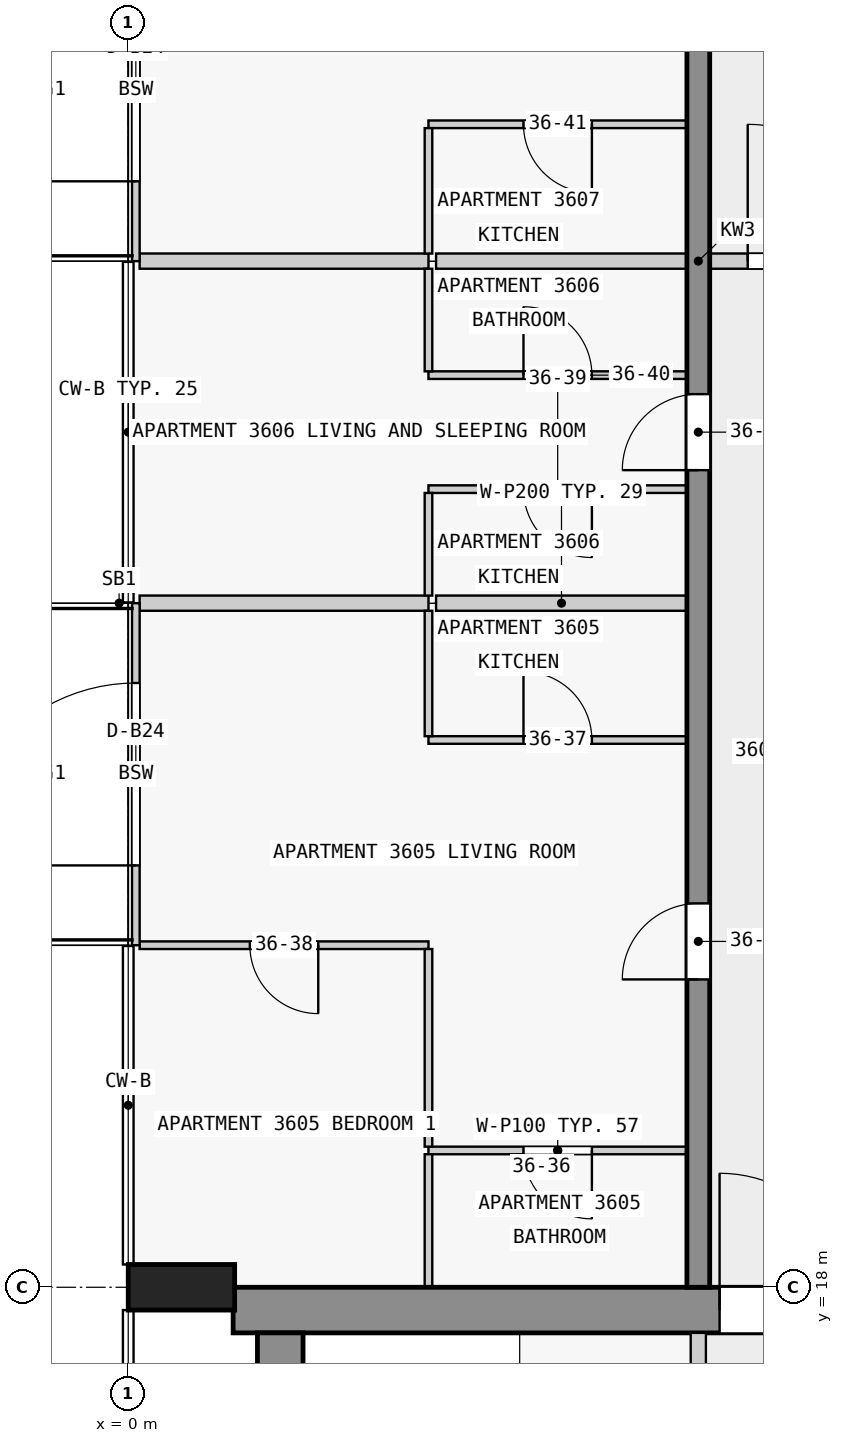
"""IFC4 building model, lengths in metres.
Left out: names, types, materials, properties, quantities, classifications, styles, units other than length and angle.
Written with IfcOpenShell. Run it as: python <this file> out.ifc"""

import sys

from ifc_helpers import new_model, si_unit, direction, frame, frame_2d, origin, origin_2d, place, context, subcontext, project, spatial, rectangle, extrude, element, fill, save


model = new_model("IFC4")
c1 = context("Model", 3, precision=1e-05, world=origin(), true_north=direction((0.0, 1.0)))
c2 = subcontext(c1, "Body", "Model", "MODEL_VIEW")
j1 = project(units=[si_unit("LENGTHUNIT", "METRE"), si_unit("PLANEANGLEUNIT", "RADIAN")], contexts=[c1])
p1 = place(None, origin())
s1 = spatial("IfcSite", under=j1, at=p1, CompositionType="ELEMENT")
p2 = place(p1, origin())
s2 = spatial("IfcBuilding", under=s1, at=p2, CompositionType="ELEMENT")
p3 = place(p2, frame((0.0, 0.0, 142.9)))
s3 = spatial("IfcBuildingStorey", under=s2, at=p3, CompositionType="ELEMENT", Elevation=142.9)
p4 = place(p3, frame((0.7, 18.0, 0.0), z_axis=(0.0, 0.0, 1.0), x_axis=(0.0, 1.0, 0.0)))
e1 = element("IfcColumn", 1, at=p4, inside=s3, PredefinedType="COLUMN", context=c2, shape_type="SweptSolid", body=[
    extrude(rectangle(XDim=0.6, YDim=1.4, at=origin_2d()), origin(), (0.0, 0.0, 1.0), 3.5),
])
p5 = place(p3, frame((1.38, 17.7, 0.0), z_axis=(0.0, 0.0, 1.0), x_axis=(1.0, 0.0, 0.0)))
e2 = element("IfcWall", 2, at=p5, inside=s3, PredefinedType="SHEAR", context=c2, shape_type="SweptSolid", body=[
    extrude(rectangle(XDim=21.12, YDim=0.6, at=frame_2d((10.56, 0.0))), origin(), (0.0, 0.0, 1.0), 3.25),
])
p6 = place(p5, frame((6.4, 0.0, 0.0)))
e3 = element("IfcOpeningElement", 3, at=p6, cuts=e2, PredefinedType="OPENING", context=c2, shape_type="SweptSolid", body=[
    extrude(rectangle(XDim=1.8, YDim=2.1, at=frame_2d((0.9, 1.05))), frame((0.0, 0.31, 0.0), z_axis=(0.0, -1.0, 0.0), x_axis=(1.0, 0.0, 0.0)), (0.0, 0.0, 1.0), 0.62),
])
p7 = place(p3, frame((2.0, 2.5, 0.0), z_axis=(0.0, 0.0, 1.0), x_axis=(0.0, 1.0, 0.0)))
e4 = element("IfcWall", 4, at=p7, inside=s3, PredefinedType="SHEAR", context=c2, shape_type="SweptSolid", body=[
    extrude(rectangle(XDim=14.9, YDim=0.6, at=frame_2d((7.45, 0.0))), origin(), (0.0, 0.0, 1.0), 3.25),
])
p8 = place(p3, frame((7.5, 18.0, 0.0), z_axis=(0.0, 0.0, 1.0), x_axis=(0.0, 1.0, 0.0)))
e5 = element("IfcWall", 5, at=p8, inside=s3, PredefinedType="SHEAR", context=c2, shape_type="SweptSolid", body=[
    extrude(rectangle(XDim=27.0, YDim=0.3, at=frame_2d((13.5, 0.0))), origin(), (0.0, 0.0, 1.0), 3.25),
])
p9 = place(p8, frame((4.05, 0.0, 0.0)))
e6 = element("IfcOpeningElement", 6, at=p9, cuts=e5, PredefinedType="OPENING", context=c2, shape_type="SweptSolid", body=[
    extrude(rectangle(XDim=1.0, YDim=2.1, at=frame_2d((0.5, 1.05))), frame((0.0, 0.16, 0.0), z_axis=(0.0, -1.0, 0.0), x_axis=(1.0, 0.0, 0.0)), (0.0, 0.0, 1.0), 0.32),
])
p10 = place(p8, frame((10.75, 0.0, 0.0)))
e7 = element("IfcOpeningElement", 7, at=p10, cuts=e5, PredefinedType="OPENING", context=c2, shape_type="SweptSolid", body=[
    extrude(rectangle(XDim=1.0, YDim=2.1, at=frame_2d((0.5, 1.05))), frame((0.0, 0.16, 0.0), z_axis=(0.0, -1.0, 0.0), x_axis=(1.0, 0.0, 0.0)), (0.0, 0.0, 1.0), 0.32),
])
p11 = place(p8, frame((17.55, 0.0, 0.0)))
e8 = element("IfcOpeningElement", 8, at=p11, cuts=e5, PredefinedType="OPENING", context=c2, shape_type="SweptSolid", body=[
    extrude(rectangle(XDim=1.0, YDim=2.1, at=frame_2d((0.5, 1.05))), frame((0.0, 0.16, 0.0), z_axis=(0.0, -1.0, 0.0), x_axis=(1.0, 0.0, 0.0)), (0.0, 0.0, 1.0), 0.32),
])
p12 = place(p8, frame((23.25, 0.0, 0.0)))
e9 = element("IfcOpeningElement", 9, at=p12, cuts=e5, PredefinedType="OPENING", context=c2, shape_type="SweptSolid", body=[
    extrude(rectangle(XDim=0.9, YDim=2.1, at=frame_2d((0.45, 1.05))), frame((0.0, 0.16, 0.0), z_axis=(0.0, -1.0, 0.0), x_axis=(1.0, 0.0, 0.0)), (0.0, 0.0, 1.0), 0.32),
])
p13 = place(p8, frame((25.45, 0.0, 0.0)))
e10 = element("IfcOpeningElement", 10, at=p13, cuts=e5, PredefinedType="OPENING", context=c2, shape_type="SweptSolid", body=[
    extrude(rectangle(XDim=1.0, YDim=2.1, at=frame_2d((0.5, 1.05))), frame((0.0, 0.16, 0.0), z_axis=(0.0, -1.0, 0.0), x_axis=(1.0, 0.0, 0.0)), (0.0, 0.0, 1.0), 0.32),
])
p14 = place(p3, frame((0.1, 22.5, 0.0), z_axis=(0.0, 0.0, 1.0), x_axis=(0.0, 1.0, 0.0)))
e11 = element("IfcWall", 11, at=p14, inside=s3, PredefinedType="STANDARD", context=c2, shape_type="SweptSolid", body=[
    extrude(rectangle(XDim=4.5, YDim=0.1, at=frame_2d((2.25, 0.0))), origin(), (0.0, 0.0, 1.0), 3.25),
])
p15 = place(p14, frame((1.05, 0.0, 0.0)))
e12 = element("IfcOpeningElement", 12, at=p15, cuts=e11, PredefinedType="OPENING", context=c2, shape_type="SweptSolid", body=[
    extrude(rectangle(XDim=2.4, YDim=2.4, at=frame_2d((1.2, 1.2))), frame((0.0, 0.06, 0.0), z_axis=(0.0, -1.0, 0.0), x_axis=(1.0, 0.0, 0.0)), (0.0, 0.0, 1.0), 0.12),
])
p16 = place(p3, frame((0.1, 31.5, 0.0), z_axis=(0.0, 0.0, 1.0), x_axis=(0.0, 1.0, 0.0)))
e13 = element("IfcWall", 13, at=p16, inside=s3, PredefinedType="STANDARD", context=c2, shape_type="SweptSolid", body=[
    extrude(rectangle(XDim=4.5, YDim=0.1, at=frame_2d((2.25, 0.0))), origin(), (0.0, 0.0, 1.0), 3.25),
])
p17 = place(p16, frame((1.05, 0.0, 0.0)))
e14 = element("IfcOpeningElement", 14, at=p17, cuts=e13, PredefinedType="OPENING", context=c2, shape_type="SweptSolid", body=[
    extrude(rectangle(XDim=2.4, YDim=2.4, at=frame_2d((1.2, 1.2))), frame((0.0, 0.06, 0.0), z_axis=(0.0, -1.0, 0.0), x_axis=(1.0, 0.0, 0.0)), (0.0, 0.0, 1.0), 0.12),
])
p18 = place(p3, frame((7.5, 10.1, 0.0), z_axis=(0.0, 0.0, 1.0), x_axis=(0.0, 1.0, 0.0)))
e15 = element("IfcWall", 15, at=p18, inside=s3, PredefinedType="PARTITIONING", context=c2, shape_type="SweptSolid", body=[
    extrude(rectangle(XDim=7.3, YDim=0.2, at=frame_2d((3.65, 0.0))), origin(), (0.0, 0.0, 1.0), 3.25),
])
p19 = place(p18, frame((0.75, 0.0, 0.0)))
e16 = element("IfcOpeningElement", 16, at=p19, cuts=e15, PredefinedType="OPENING", context=c2, shape_type="SweptSolid", body=[
    extrude(rectangle(XDim=0.9, YDim=2.1, at=frame_2d((0.45, 1.05))), frame((0.0, 0.11, 0.0), z_axis=(0.0, -1.0, 0.0), x_axis=(1.0, 0.0, 0.0)), (0.0, 0.0, 1.0), 0.22),
])
p20 = place(p18, frame((4.4, 0.0, 0.0)))
e17 = element("IfcOpeningElement", 17, at=p20, cuts=e15, PredefinedType="OPENING", context=c2, shape_type="SweptSolid", body=[
    extrude(rectangle(XDim=0.9, YDim=2.1, at=frame_2d((0.45, 1.05))), frame((0.0, 0.11, 0.0), z_axis=(0.0, -1.0, 0.0), x_axis=(1.0, 0.0, 0.0)), (0.0, 0.0, 1.0), 0.22),
])
p21 = place(p3, frame((7.35, 19.8, 0.0), z_axis=(0.0, 0.0, 1.0), x_axis=(-1.0, 0.0, 0.0)))
e18 = element("IfcWall", 18, at=p21, inside=s3, PredefinedType="PARTITIONING", context=c2, shape_type="SweptSolid", body=[
    extrude(rectangle(XDim=3.4, YDim=0.1, at=frame_2d((1.7, 0.0))), origin(), (0.0, 0.0, 1.0), 3.25),
])
p22 = place(p21, frame((1.25, 0.0, 0.0)))
e19 = element("IfcOpeningElement", 19, at=p22, cuts=e18, PredefinedType="OPENING", context=c2, shape_type="SweptSolid", body=[
    extrude(rectangle(XDim=0.9, YDim=2.1, at=frame_2d((0.45, 1.05))), frame((0.0, 0.06, 0.0), z_axis=(0.0, -1.0, 0.0), x_axis=(1.0, 0.0, 0.0)), (0.0, 0.0, 1.0), 0.12),
])
p23 = place(p3, frame((3.95, 22.5, 0.0), z_axis=(0.0, 0.0, 1.0), x_axis=(-1.0, 0.0, 0.0)))
e20 = element("IfcWall", 20, at=p23, inside=s3, PredefinedType="PARTITIONING", context=c2, shape_type="SweptSolid", body=[
    extrude(rectangle(XDim=3.8, YDim=0.1, at=frame_2d((1.9, 0.0))), origin(), (0.0, 0.0, 1.0), 3.25),
])
p24 = place(p23, frame((1.45, 0.0, 0.0)))
e21 = element("IfcOpeningElement", 21, at=p24, cuts=e20, PredefinedType="OPENING", context=c2, shape_type="SweptSolid", body=[
    extrude(rectangle(XDim=0.9, YDim=2.1, at=frame_2d((0.45, 1.05))), frame((0.0, 0.06, 0.0), z_axis=(0.0, -1.0, 0.0), x_axis=(1.0, 0.0, 0.0)), (0.0, 0.0, 1.0), 0.12),
])
p25 = place(p3, frame((3.95, 25.2, 0.0), z_axis=(0.0, 0.0, 1.0), x_axis=(1.0, 0.0, 0.0)))
e22 = element("IfcWall", 22, at=p25, inside=s3, PredefinedType="PARTITIONING", context=c2, shape_type="SweptSolid", body=[
    extrude(rectangle(XDim=3.4, YDim=0.1, at=frame_2d((1.7, 0.0))), origin(), (0.0, 0.0, 1.0), 3.25),
])
p26 = place(p25, frame((1.25, 0.0, 0.0)))
e23 = element("IfcOpeningElement", 23, at=p26, cuts=e22, PredefinedType="OPENING", context=c2, shape_type="SweptSolid", body=[
    extrude(rectangle(XDim=0.9, YDim=2.1, at=frame_2d((0.45, 1.05))), frame((0.0, 0.06, 0.0), z_axis=(0.0, -1.0, 0.0), x_axis=(1.0, 0.0, 0.0)), (0.0, 0.0, 1.0), 0.12),
])
p27 = place(p3, frame((7.35, 27.0, 0.0), z_axis=(0.0, 0.0, 1.0), x_axis=(-1.0, 0.0, 0.0)))
e24 = element("IfcWall", 24, at=p27, inside=s3, PredefinedType="PARTITIONING", context=c2, shape_type="SweptSolid", body=[
    extrude(rectangle(XDim=3.3, YDim=0.2, at=frame_2d((1.65, 0.0))), origin(), (0.0, 0.0, 1.0), 3.25),
])
p28 = place(p3, frame((0.15, 27.0, 0.0), z_axis=(0.0, 0.0, 1.0), x_axis=(1.0, 0.0, 0.0)))
e25 = element("IfcWall", 25, at=p28, inside=s3, PredefinedType="PARTITIONING", context=c2, shape_type="SweptSolid", body=[
    extrude(rectangle(XDim=3.8, YDim=0.2, at=frame_2d((1.9, 0.0))), origin(), (0.0, 0.0, 1.0), 3.25),
])
p29 = place(p3, frame((7.35, 28.5, 0.0), z_axis=(0.0, 0.0, 1.0), x_axis=(-1.0, 0.0, 0.0)))
e26 = element("IfcWall", 26, at=p29, inside=s3, PredefinedType="PARTITIONING", context=c2, shape_type="SweptSolid", body=[
    extrude(rectangle(XDim=3.4, YDim=0.1, at=frame_2d((1.7, 0.0))), origin(), (0.0, 0.0, 1.0), 3.25),
])
p30 = place(p29, frame((1.25, 0.0, 0.0)))
e27 = element("IfcOpeningElement", 27, at=p30, cuts=e26, PredefinedType="OPENING", context=c2, shape_type="SweptSolid", body=[
    extrude(rectangle(XDim=0.9, YDim=2.1, at=frame_2d((0.45, 1.05))), frame((0.0, 0.06, 0.0), z_axis=(0.0, -1.0, 0.0), x_axis=(1.0, 0.0, 0.0)), (0.0, 0.0, 1.0), 0.12),
])
p31 = place(p3, frame((3.95, 30.0, 0.0), z_axis=(0.0, 0.0, 1.0), x_axis=(1.0, 0.0, 0.0)))
e28 = element("IfcWall", 28, at=p31, inside=s3, PredefinedType="PARTITIONING", context=c2, shape_type="SweptSolid", body=[
    extrude(rectangle(XDim=3.4, YDim=0.1, at=frame_2d((1.7, 0.0))), origin(), (0.0, 0.0, 1.0), 3.25),
])
p32 = place(p31, frame((1.25, 0.0, 0.0)))
e29 = element("IfcOpeningElement", 29, at=p32, cuts=e28, PredefinedType="OPENING", context=c2, shape_type="SweptSolid", body=[
    extrude(rectangle(XDim=0.9, YDim=2.1, at=frame_2d((0.45, 1.05))), frame((0.0, 0.06, 0.0), z_axis=(0.0, -1.0, 0.0), x_axis=(1.0, 0.0, 0.0)), (0.0, 0.0, 1.0), 0.12),
])
p33 = place(p3, frame((7.35, 31.5, 0.0), z_axis=(0.0, 0.0, 1.0), x_axis=(-1.0, 0.0, 0.0)))
e30 = element("IfcWall", 30, at=p33, inside=s3, PredefinedType="PARTITIONING", context=c2, shape_type="SweptSolid", body=[
    extrude(rectangle(XDim=3.3, YDim=0.2, at=frame_2d((1.65, 0.0))), origin(), (0.0, 0.0, 1.0), 3.25),
])
p34 = place(p3, frame((0.15, 31.5, 0.0), z_axis=(0.0, 0.0, 1.0), x_axis=(1.0, 0.0, 0.0)))
e31 = element("IfcWall", 31, at=p34, inside=s3, PredefinedType="PARTITIONING", context=c2, shape_type="SweptSolid", body=[
    extrude(rectangle(XDim=3.8, YDim=0.2, at=frame_2d((1.9, 0.0))), origin(), (0.0, 0.0, 1.0), 3.25),
])
p35 = place(p3, frame((7.35, 33.3, 0.0), z_axis=(0.0, 0.0, 1.0), x_axis=(-1.0, 0.0, 0.0)))
e32 = element("IfcWall", 32, at=p35, inside=s3, PredefinedType="PARTITIONING", context=c2, shape_type="SweptSolid", body=[
    extrude(rectangle(XDim=3.4, YDim=0.1, at=frame_2d((1.7, 0.0))), origin(), (0.0, 0.0, 1.0), 3.25),
])
p36 = place(p35, frame((1.25, 0.0, 0.0)))
e33 = element("IfcOpeningElement", 33, at=p36, cuts=e32, PredefinedType="OPENING", context=c2, shape_type="SweptSolid", body=[
    extrude(rectangle(XDim=0.9, YDim=2.1, at=frame_2d((0.45, 1.05))), frame((0.0, 0.06, 0.0), z_axis=(0.0, -1.0, 0.0), x_axis=(1.0, 0.0, 0.0)), (0.0, 0.0, 1.0), 0.12),
])
p37 = place(p3, frame((3.95, 19.75, 0.0), z_axis=(0.0, 0.0, 1.0), x_axis=(0.0, -1.0, 0.0)))
e34 = element("IfcWall", 34, at=p37, inside=s3, PredefinedType="PARTITIONING", context=c2, shape_type="SweptSolid", body=[
    extrude(rectangle(XDim=1.75, YDim=0.1, at=frame_2d((0.875, 0.0))), origin(), (0.0, 0.0, 1.0), 3.25),
])
p38 = place(p3, frame((3.95, 26.9, 0.0), z_axis=(0.0, 0.0, 1.0), x_axis=(0.0, -1.0, 0.0)))
e35 = element("IfcWall", 35, at=p38, inside=s3, PredefinedType="PARTITIONING", context=c2, shape_type="SweptSolid", body=[
    extrude(rectangle(XDim=1.65, YDim=0.1, at=frame_2d((0.825, 0.0))), origin(), (0.0, 0.0, 1.0), 3.25),
])
for number, where, z_axis, x_axis in (
    (36, (3.95, 28.45, 0.0), (0.0, 0.0, 1.0), (0.0, -1.0, 0.0)),
    (37, (3.95, 31.4, 0.0), (0.0, 0.0, 1.0), (0.0, -1.0, 0.0)),
):
    element("IfcWall", number, at=place(p3, frame(where, z_axis=z_axis, x_axis=x_axis)), inside=s3, PredefinedType="PARTITIONING", context=c2, shape_type="SweptSolid", body=[
        extrude(rectangle(XDim=1.35, YDim=0.1, at=frame_2d((0.675, 0.0))), origin(), (0.0, 0.0, 1.0), 3.25),
    ])
p39 = place(p3, frame((3.95, 33.25, 0.0), z_axis=(0.0, 0.0, 1.0), x_axis=(0.0, -1.0, 0.0)))
e38 = element("IfcWall", 38, at=p39, inside=s3, PredefinedType="PARTITIONING", context=c2, shape_type="SweptSolid", body=[
    extrude(rectangle(XDim=1.65, YDim=0.1, at=frame_2d((0.825, 0.0))), origin(), (0.0, 0.0, 1.0), 3.25),
])
p40 = place(p3, frame((3.95, 19.85, 0.0), z_axis=(0.0, 0.0, 1.0), x_axis=(0.0, 1.0, 0.0)))
e39 = element("IfcWall", 39, at=p40, inside=s3, PredefinedType="PARTITIONING", context=c2, shape_type="SweptSolid", body=[
    extrude(rectangle(XDim=2.6, YDim=0.1, at=frame_2d((1.3, 0.0))), origin(), (0.0, 0.0, 1.0), 3.25),
])
p41 = place(p3, frame((7.45, 31.5, 0.0), z_axis=(0.0, 0.0, 1.0), x_axis=(1.0, 0.0, 0.0)))
e40 = element("IfcWall", 40, at=p41, inside=s3, PredefinedType="PARTITIONING", context=c2, shape_type="SweptSolid", body=[
    extrude(rectangle(XDim=3.1, YDim=0.2, at=frame_2d((1.55, 0.0))), origin(), (0.0, 0.0, 1.0), 3.25),
])
p42 = place(p41, frame((0.7, 0.0, 0.0)))
e41 = element("IfcOpeningElement", 41, at=p42, cuts=e40, PredefinedType="OPENING", context=c2, shape_type="SweptSolid", body=[
    extrude(rectangle(XDim=1.8, YDim=2.1, at=frame_2d((0.9, 1.05))), frame((0.0, 0.11, 0.0), z_axis=(0.0, -1.0, 0.0), x_axis=(1.0, 0.0, 0.0)), (0.0, 0.0, 1.0), 0.22),
])
p43 = place(p15, origin())
e42 = element("IfcDoor", 42, at=p43, inside=s3, OperationType="SINGLE_SWING_LEFT", PredefinedType="DOOR", context=c2, shape_type="SweptSolid", body=[
    extrude(rectangle(XDim=2.4, YDim=2.4, at=frame_2d((1.2, 1.2))), frame((0.0, 0.025, 0.0), z_axis=(0.0, -1.0, 0.0), x_axis=(1.0, 0.0, 0.0)), (0.0, 0.0, 1.0), 0.05),
])
fill(e12, e42)
p44 = place(p17, origin())
e43 = element("IfcDoor", 43, at=p44, inside=s3, OperationType="SINGLE_SWING_LEFT", PredefinedType="DOOR", context=c2, shape_type="SweptSolid", body=[
    extrude(rectangle(XDim=2.4, YDim=2.4, at=frame_2d((1.2, 1.2))), frame((0.0, 0.025, 0.0), z_axis=(0.0, -1.0, 0.0), x_axis=(1.0, 0.0, 0.0)), (0.0, 0.0, 1.0), 0.05),
])
fill(e14, e43)
p45 = place(p6, origin())
e44 = element("IfcDoor", 44, at=p45, inside=s3, OperationType="DOUBLE_DOOR_SINGLE_SWING", PredefinedType="DOOR", context=c2, shape_type="SweptSolid", body=[
    extrude(rectangle(XDim=1.8, YDim=2.1, at=frame_2d((0.9, 1.05))), frame((0.0, 0.025, 0.0), z_axis=(0.0, -1.0, 0.0), x_axis=(1.0, 0.0, 0.0)), (0.0, 0.0, 1.0), 0.05),
])
fill(e3, e44)
p46 = place(p9, origin())
e45 = element("IfcDoor", 45, at=p46, inside=s3, OperationType="SINGLE_SWING_LEFT", PredefinedType="DOOR", context=c2, shape_type="SweptSolid", body=[
    extrude(rectangle(XDim=1.0, YDim=2.1, at=frame_2d((0.5, 1.05))), frame((0.0, 0.025, 0.0), z_axis=(0.0, -1.0, 0.0), x_axis=(1.0, 0.0, 0.0)), (0.0, 0.0, 1.0), 0.05),
])
fill(e6, e45)
p47 = place(p10, origin())
e46 = element("IfcDoor", 46, at=p47, inside=s3, OperationType="SINGLE_SWING_LEFT", PredefinedType="DOOR", context=c2, shape_type="SweptSolid", body=[
    extrude(rectangle(XDim=1.0, YDim=2.1, at=frame_2d((0.5, 1.05))), frame((0.0, 0.025, 0.0), z_axis=(0.0, -1.0, 0.0), x_axis=(1.0, 0.0, 0.0)), (0.0, 0.0, 1.0), 0.05),
])
fill(e7, e46)
p48 = place(p42, origin())
e47 = element("IfcDoor", 47, at=p48, inside=s3, OperationType="SINGLE_SWING_RIGHT", PredefinedType="DOOR", context=c2, shape_type="SweptSolid", body=[
    extrude(rectangle(XDim=1.8, YDim=2.1, at=frame_2d((0.9, 1.05))), frame((0.0, 0.025, 0.0), z_axis=(0.0, -1.0, 0.0), x_axis=(1.0, 0.0, 0.0)), (0.0, 0.0, 1.0), 0.05),
])
fill(e41, e47)
p49 = place(p22, origin())
e48 = element("IfcDoor", 48, at=p49, inside=s3, OperationType="SINGLE_SWING_RIGHT", PredefinedType="DOOR", context=c2, shape_type="SweptSolid", body=[
    extrude(rectangle(XDim=0.9, YDim=2.1, at=frame_2d((0.45, 1.05))), frame((0.0, 0.025, 0.0), z_axis=(0.0, -1.0, 0.0), x_axis=(1.0, 0.0, 0.0)), (0.0, 0.0, 1.0), 0.05),
])
fill(e19, e48)
p50 = place(p26, origin())
e49 = element("IfcDoor", 49, at=p50, inside=s3, OperationType="SINGLE_SWING_RIGHT", PredefinedType="DOOR", context=c2, shape_type="SweptSolid", body=[
    extrude(rectangle(XDim=0.9, YDim=2.1, at=frame_2d((0.45, 1.05))), frame((0.0, 0.025, 0.0), z_axis=(0.0, -1.0, 0.0), x_axis=(1.0, 0.0, 0.0)), (0.0, 0.0, 1.0), 0.05),
])
fill(e23, e49)
p51 = place(p24, origin())
e50 = element("IfcDoor", 50, at=p51, inside=s3, OperationType="SINGLE_SWING_LEFT", PredefinedType="DOOR", context=c2, shape_type="SweptSolid", body=[
    extrude(rectangle(XDim=0.9, YDim=2.1, at=frame_2d((0.45, 1.05))), frame((0.0, 0.025, 0.0), z_axis=(0.0, -1.0, 0.0), x_axis=(1.0, 0.0, 0.0)), (0.0, 0.0, 1.0), 0.05),
])
fill(e21, e50)
p52 = place(p30, origin())
e51 = element("IfcDoor", 51, at=p52, inside=s3, OperationType="SINGLE_SWING_RIGHT", PredefinedType="DOOR", context=c2, shape_type="SweptSolid", body=[
    extrude(rectangle(XDim=0.9, YDim=2.1, at=frame_2d((0.45, 1.05))), frame((0.0, 0.025, 0.0), z_axis=(0.0, -1.0, 0.0), x_axis=(1.0, 0.0, 0.0)), (0.0, 0.0, 1.0), 0.05),
])
fill(e27, e51)
p53 = place(p32, origin())
e52 = element("IfcDoor", 52, at=p53, inside=s3, OperationType="SINGLE_SWING_RIGHT", PredefinedType="DOOR", context=c2, shape_type="SweptSolid", body=[
    extrude(rectangle(XDim=0.9, YDim=2.1, at=frame_2d((0.45, 1.05))), frame((0.0, 0.025, 0.0), z_axis=(0.0, -1.0, 0.0), x_axis=(1.0, 0.0, 0.0)), (0.0, 0.0, 1.0), 0.05),
])
fill(e29, e52)
p54 = place(p36, origin())
e53 = element("IfcDoor", 53, at=p54, inside=s3, OperationType="SINGLE_SWING_RIGHT", PredefinedType="DOOR", context=c2, shape_type="SweptSolid", body=[
    extrude(rectangle(XDim=0.9, YDim=2.1, at=frame_2d((0.45, 1.05))), frame((0.0, 0.025, 0.0), z_axis=(0.0, -1.0, 0.0), x_axis=(1.0, 0.0, 0.0)), (0.0, 0.0, 1.0), 0.05),
])
fill(e33, e53)
save(model, sys.argv[1])
